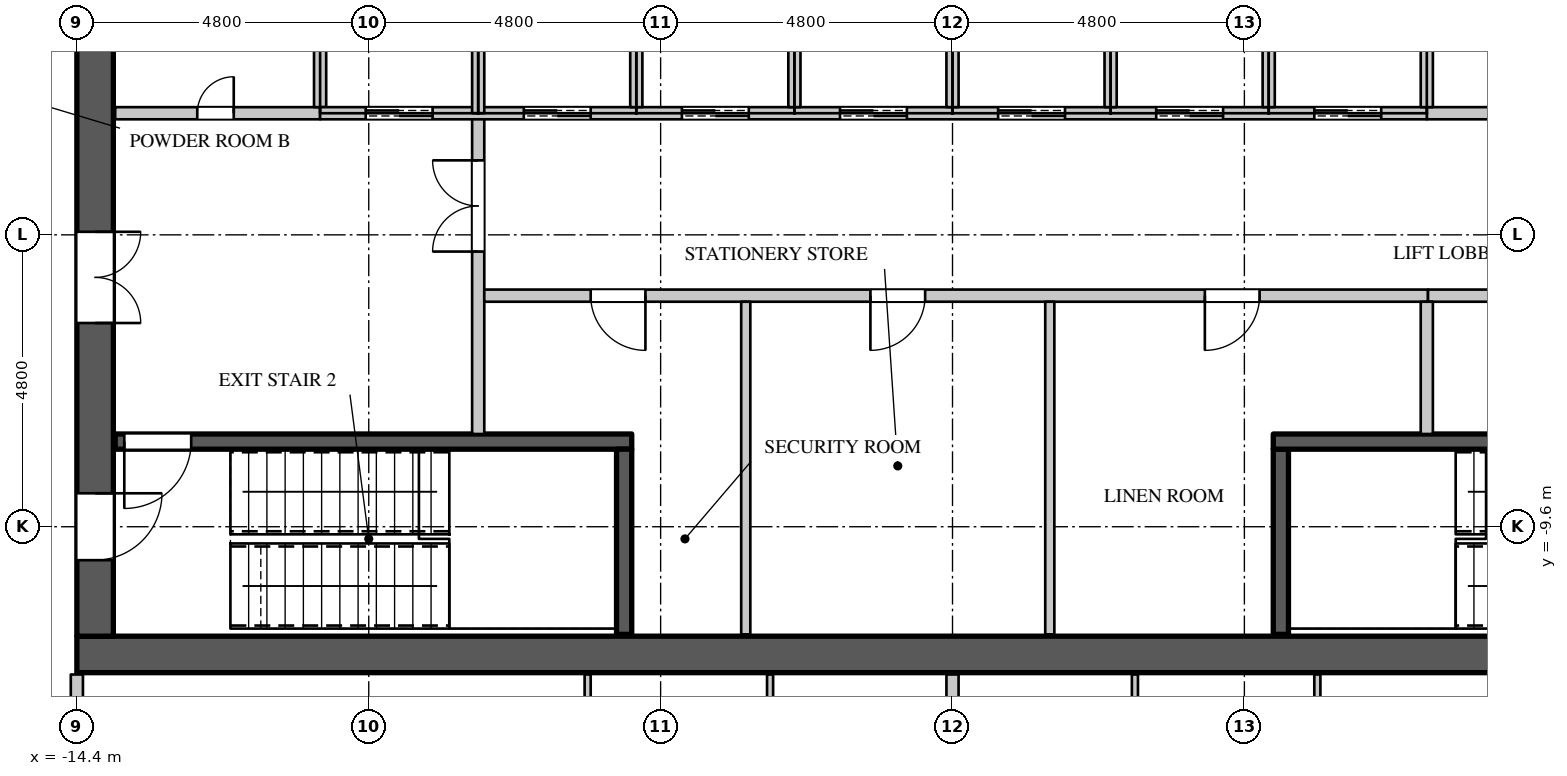
"""IFC4 building model, lengths in metres.
Left out: names, types, materials, properties, quantities, classifications, styles, units other than length and angle.
Written with IfcOpenShell. Run it as: python <this file> out.ifc"""

import sys

from ifc_helpers import new_model, si_unit, direction, frame, frame_2d, origin, place, context, subcontext, project, spatial, rectangle, extrude, element, fill, save


model = new_model("IFC4")
c1 = context("Model", 3, precision=1e-05, world=origin(), true_north=direction((0.0, 1.0)))
c2 = subcontext(c1, "Body", "Model", "MODEL_VIEW")
j1 = project(units=[si_unit("LENGTHUNIT", "METRE"), si_unit("PLANEANGLEUNIT", "RADIAN")], contexts=[c1])
p1 = place(None, origin())
s1 = spatial("IfcSite", under=j1, at=p1, CompositionType="ELEMENT")
p2 = place(p1, origin())
s2 = spatial("IfcBuilding", under=s1, at=p2, CompositionType="ELEMENT")
p3 = place(p2, frame((0.0, 0.0, 247.5)))
s3 = spatial("IfcBuildingStorey", under=s2, at=p3, CompositionType="ELEMENT", Elevation=247.5)
p4 = place(p3, frame((-14.4, -11.7, 0.0), z_axis=(0.0, 0.0, 1.0), x_axis=(1.0, 0.0, 0.0)))
e1 = element("IfcWall", 1, at=p4, inside=s3, PredefinedType="SHEAR", context=c2, shape_type="SweptSolid", body=[
    extrude(rectangle(XDim=28.8, YDim=0.6, at=frame_2d((14.4, 0.0))), origin(), (0.0, 0.0, 1.0), 4.2),
])
p5 = place(p3, frame((-14.1, -11.4, 0.0), z_axis=(0.0, 0.0, 1.0), x_axis=(0.0, 1.0, 0.0)))
e2 = element("IfcWall", 2, at=p5, inside=s3, PredefinedType="SHEAR", context=c2, shape_type="SweptSolid", body=[
    extrude(rectangle(XDim=22.8, YDim=0.6, at=frame_2d((11.4, 0.0))), origin(), (0.0, 0.0, 1.0), 4.2),
])
p6 = place(p5, frame((20.45, 0.0, 0.0)))
e3 = element("IfcOpeningElement", 3, at=p6, cuts=e2, PredefinedType="OPENING", context=c2, shape_type="SweptSolid", body=[
    extrude(rectangle(XDim=1.1, YDim=2.2, at=frame_2d((0.55, 1.1))), frame((0.0, 0.31, 0.0), z_axis=(0.0, -1.0, 0.0), x_axis=(1.0, 0.0, 0.0)), (0.0, 0.0, 1.0), 0.62),
])
p7 = place(p5, frame((1.25, 0.0, 0.0)))
e4 = element("IfcOpeningElement", 4, at=p7, cuts=e2, PredefinedType="OPENING", context=c2, shape_type="SweptSolid", body=[
    extrude(rectangle(XDim=1.1, YDim=2.2, at=frame_2d((0.55, 1.1))), frame((0.0, 0.31, 0.0), z_axis=(0.0, -1.0, 0.0), x_axis=(1.0, 0.0, 0.0)), (0.0, 0.0, 1.0), 0.62),
])
p8 = place(p5, frame((16.15, 0.0, 0.0)))
e5 = element("IfcOpeningElement", 5, at=p8, cuts=e2, PredefinedType="OPENING", context=c2, shape_type="SweptSolid", body=[
    extrude(rectangle(XDim=1.5, YDim=2.4, at=frame_2d((0.75, 1.2))), frame((0.0, 0.31, 0.0), z_axis=(0.0, -1.0, 0.0), x_axis=(1.0, 0.0, 0.0)), (0.0, 0.0, 1.0), 0.62),
])
p9 = place(p5, frame((5.15, 0.0, 0.0)))
e6 = element("IfcOpeningElement", 6, at=p9, cuts=e2, PredefinedType="OPENING", context=c2, shape_type="SweptSolid", body=[
    extrude(rectangle(XDim=1.5, YDim=2.4, at=frame_2d((0.75, 1.2))), frame((0.0, 0.31, 0.0), z_axis=(0.0, -1.0, 0.0), x_axis=(1.0, 0.0, 0.0)), (0.0, 0.0, 1.0), 0.62),
])
p10 = place(p3, frame((-14.4, -14.3, 0.0), z_axis=(0.0, 0.0, 1.0), x_axis=(0.0, 1.0, 0.0)))
e7 = element("IfcWall", 7, at=p10, inside=s3, PredefinedType="PARTITIONING", context=c2, shape_type="SweptSolid", body=[
    extrude(rectangle(XDim=2.27, YDim=0.2, at=frame_2d((1.135, 0.0))), origin(), (0.0, 0.0, 1.0), 3.95),
])
p11 = place(p3, frame((-7.8, -8.075, 0.0), z_axis=(0.0, 0.0, 1.0), x_axis=(0.0, 1.0, 0.0)))
e8 = element("IfcWall", 8, at=p11, inside=s3, PredefinedType="PARTITIONING", context=c2, shape_type="SweptSolid", body=[
    extrude(rectangle(XDim=5.275, YDim=0.2, at=frame_2d((2.637, 0.0))), origin(), (0.0, 0.0, 1.0), 3.95),
])
p12 = place(p11, frame((3.0, 0.0, 0.0)))
e9 = element("IfcOpeningElement", 9, at=p12, cuts=e8, PredefinedType="OPENING", context=c2, shape_type="SweptSolid", body=[
    extrude(rectangle(XDim=1.5, YDim=2.4, at=frame_2d((0.75, 1.2))), frame((0.0, 0.11, 0.0), z_axis=(0.0, -1.0, 0.0), x_axis=(1.0, 0.0, 0.0)), (0.0, 0.0, 1.0), 0.22),
])
p13 = place(p3, frame((-7.7, -5.8, 0.0), z_axis=(0.0, 0.0, 1.0), x_axis=(1.0, 0.0, 0.0)))
e10 = element("IfcWall", 10, at=p13, inside=s3, PredefinedType="PARTITIONING", context=c2, shape_type="SweptSolid", body=[
    extrude(rectangle(XDim=15.52, YDim=0.2, at=frame_2d((7.76, 0.0))), origin(), (0.0, 0.0, 1.0), 3.95),
])
p14 = place(p13, frame((1.75, 0.0, 0.0)))
e11 = element("IfcOpeningElement", 11, at=p14, cuts=e10, PredefinedType="OPENING", context=c2, shape_type="SweptSolid", body=[
    extrude(rectangle(XDim=0.9, YDim=2.2, at=frame_2d((0.45, 1.1))), frame((0.0, 0.11, 0.0), z_axis=(0.0, -1.0, 0.0), x_axis=(1.0, 0.0, 0.0)), (0.0, 0.0, 1.0), 0.22),
])
p15 = place(p13, frame((6.35, 0.0, 0.0)))
e12 = element("IfcOpeningElement", 12, at=p15, cuts=e10, PredefinedType="OPENING", context=c2, shape_type="SweptSolid", body=[
    extrude(rectangle(XDim=0.9, YDim=2.2, at=frame_2d((0.45, 1.1))), frame((0.0, 0.11, 0.0), z_axis=(0.0, -1.0, 0.0), x_axis=(1.0, 0.0, 0.0)), (0.0, 0.0, 1.0), 0.22),
])
p16 = place(p13, frame((11.85, 0.0, 0.0)))
e13 = element("IfcOpeningElement", 13, at=p16, cuts=e10, PredefinedType="OPENING", context=c2, shape_type="SweptSolid", body=[
    extrude(rectangle(XDim=0.9, YDim=2.2, at=frame_2d((0.45, 1.1))), frame((0.0, 0.11, 0.0), z_axis=(0.0, -1.0, 0.0), x_axis=(1.0, 0.0, 0.0)), (0.0, 0.0, 1.0), 0.22),
])
for number, where, z_axis, x_axis in (
    (14, (-3.4, -11.37, 0.0), (0.0, 0.0, 1.0), (0.0, 1.0, 0.0)),
    (15, (1.6, -11.37, 0.0), (0.0, 0.0, 1.0), (0.0, 1.0, 0.0)),
):
    element("IfcWall", number, at=place(p3, frame(where, z_axis=z_axis, x_axis=x_axis)), inside=s3, PredefinedType="PARTITIONING", context=c2, shape_type="SweptSolid", body=[
        extrude(rectangle(XDim=5.47, YDim=0.15, at=frame_2d((2.735, 0.0))), origin(), (0.0, 0.0, 1.0), 3.95),
    ])
p17 = place(p3, frame((0.0, -26.455, 0.0), z_axis=(0.0, 0.0, 1.0), x_axis=(0.0, 1.0, 0.0)))
e16 = element("IfcWall", 16, at=p17, inside=s3, PredefinedType="PARTITIONING", context=c2, shape_type="SweptSolid", body=[
    extrude(rectangle(XDim=14.425, YDim=0.2, at=frame_2d((7.212, 0.0))), origin(), (0.0, 0.0, 1.0), 3.95),
])
p18 = place(p3, frame((-13.77, -2.8, 0.0), z_axis=(0.0, 0.0, 1.0), x_axis=(1.0, 0.0, 0.0)))
e17 = element("IfcWall", 17, at=p18, inside=s3, PredefinedType="PARTITIONING", context=c2, shape_type="SweptSolid", body=[
    extrude(rectangle(XDim=3.37, YDim=0.2, at=frame_2d((1.685, 0.0))), origin(), (0.0, 0.0, 1.0), 3.95),
])
p19 = place(p18, frame((1.35, 0.0, 0.0)))
e18 = element("IfcOpeningElement", 18, at=p19, cuts=e17, PredefinedType="OPENING", context=c2, shape_type="SweptSolid", body=[
    extrude(rectangle(XDim=0.6, YDim=2.0, at=frame_2d((0.3, 1.0))), frame((0.0, 0.11, 0.0), z_axis=(0.0, -1.0, 0.0), x_axis=(1.0, 0.0, 0.0)), (0.0, 0.0, 1.0), 0.22),
])
p20 = place(p3, frame((7.82, -5.8, 0.0), z_axis=(0.0, 0.0, 1.0), x_axis=(1.0, 0.0, 0.0)))
e19 = element("IfcWall", 19, at=p20, inside=s3, PredefinedType="PARTITIONING", context=c2, shape_type="SweptSolid", body=[
    extrude(rectangle(XDim=5.95, YDim=0.2, at=frame_2d((2.975, 0.0))), origin(), (0.0, 0.0, 1.0), 3.95),
])
p21 = place(p20, frame((2.55, 0.0, 0.0)))
e20 = element("IfcOpeningElement", 20, at=p21, cuts=e19, PredefinedType="OPENING", context=c2, shape_type="SweptSolid", body=[
    extrude(rectangle(XDim=0.9, YDim=2.2, at=frame_2d((0.45, 1.1))), frame((0.0, 0.11, 0.0), z_axis=(0.0, -1.0, 0.0), x_axis=(1.0, 0.0, 0.0)), (0.0, 0.0, 1.0), 0.22),
])
p22 = place(p3, frame((7.8, -2.8, 0.0), z_axis=(0.0, 0.0, 1.0), x_axis=(1.0, 0.0, 0.0)))
e21 = element("IfcWall", 21, at=p22, inside=s3, PredefinedType="PARTITIONING", context=c2, shape_type="SweptSolid", body=[
    extrude(rectangle(XDim=5.97, YDim=0.2, at=frame_2d((2.985, 0.0))), origin(), (0.0, 0.0, 1.0), 3.95),
])
p23 = place(p22, frame((2.55, 0.0, 0.0)))
e22 = element("IfcOpeningElement", 22, at=p23, cuts=e21, PredefinedType="OPENING", context=c2, shape_type="SweptSolid", body=[
    extrude(rectangle(XDim=0.9, YDim=2.2, at=frame_2d((0.45, 1.1))), frame((0.0, 0.11, 0.0), z_axis=(0.0, -1.0, 0.0), x_axis=(1.0, 0.0, 0.0)), (0.0, 0.0, 1.0), 0.22),
])
p24 = place(p3, frame((7.8, -8.075, 0.0), z_axis=(0.0, 0.0, 1.0), x_axis=(0.0, 1.0, 0.0)))
e23 = element("IfcWall", 23, at=p24, inside=s3, PredefinedType="PARTITIONING", context=c2, shape_type="SweptSolid", body=[
    extrude(rectangle(XDim=2.175, YDim=0.2, at=frame_2d((1.087, 0.0))), origin(), (0.0, 0.0, 1.0), 3.95),
])
p25 = place(p3, frame((-10.4, -2.7, 0.0), z_axis=(0.0, 0.0, 1.0), x_axis=(0.0, 1.0, 0.0)))
e24 = element("IfcWall", 24, at=p25, inside=s3, PredefinedType="PARTITIONING", context=c2, shape_type="SweptSolid", body=[
    extrude(rectangle(XDim=2.7, YDim=0.2, at=frame_2d((1.35, 0.0))), origin(), (0.0, 0.0, 1.0), 3.95),
])
p26 = place(p3, frame((-10.4, -2.8, 0.0), z_axis=(0.0, 0.0, 1.0), x_axis=(1.0, 0.0, 0.0)))
e25 = element("IfcWall", 25, at=p26, inside=s3, PredefinedType="PARTITIONING", context=c2, shape_type="SweptSolid", body=[
    extrude(rectangle(XDim=18.2, YDim=0.2, at=frame_2d((9.1, 0.0))), origin(), (0.0, 0.0, 1.0), 3.95),
])
p27 = place(p26, frame((0.75, 0.0, 0.0)))
e26 = element("IfcOpeningElement", 26, at=p27, cuts=e25, PredefinedType="OPENING", context=c2, shape_type="SweptSolid", body=[
    extrude(rectangle(XDim=1.1, YDim=2.2, at=frame_2d((0.55, 1.1))), frame((0.0, 0.11, 0.0), z_axis=(0.0, -1.0, 0.0), x_axis=(1.0, 0.0, 0.0)), (0.0, 0.0, 1.0), 0.22),
])
p28 = place(p26, frame((3.35, 0.0, 0.0)))
e27 = element("IfcOpeningElement", 27, at=p28, cuts=e25, PredefinedType="OPENING", context=c2, shape_type="SweptSolid", body=[
    extrude(rectangle(XDim=1.1, YDim=2.2, at=frame_2d((0.55, 1.1))), frame((0.0, 0.11, 0.0), z_axis=(0.0, -1.0, 0.0), x_axis=(1.0, 0.0, 0.0)), (0.0, 0.0, 1.0), 0.22),
])
p29 = place(p26, frame((5.95, 0.0, 0.0)))
e28 = element("IfcOpeningElement", 28, at=p29, cuts=e25, PredefinedType="OPENING", context=c2, shape_type="SweptSolid", body=[
    extrude(rectangle(XDim=1.1, YDim=2.2, at=frame_2d((0.55, 1.1))), frame((0.0, 0.11, 0.0), z_axis=(0.0, -1.0, 0.0), x_axis=(1.0, 0.0, 0.0)), (0.0, 0.0, 1.0), 0.22),
])
p30 = place(p26, frame((8.55, 0.0, 0.0)))
e29 = element("IfcOpeningElement", 29, at=p30, cuts=e25, PredefinedType="OPENING", context=c2, shape_type="SweptSolid", body=[
    extrude(rectangle(XDim=1.1, YDim=2.2, at=frame_2d((0.55, 1.1))), frame((0.0, 0.11, 0.0), z_axis=(0.0, -1.0, 0.0), x_axis=(1.0, 0.0, 0.0)), (0.0, 0.0, 1.0), 0.22),
])
p31 = place(p26, frame((11.15, 0.0, 0.0)))
e30 = element("IfcOpeningElement", 30, at=p31, cuts=e25, PredefinedType="OPENING", context=c2, shape_type="SweptSolid", body=[
    extrude(rectangle(XDim=1.1, YDim=2.2, at=frame_2d((0.55, 1.1))), frame((0.0, 0.11, 0.0), z_axis=(0.0, -1.0, 0.0), x_axis=(1.0, 0.0, 0.0)), (0.0, 0.0, 1.0), 0.22),
])
p32 = place(p26, frame((13.75, 0.0, 0.0)))
e31 = element("IfcOpeningElement", 31, at=p32, cuts=e25, PredefinedType="OPENING", context=c2, shape_type="SweptSolid", body=[
    extrude(rectangle(XDim=1.1, YDim=2.2, at=frame_2d((0.55, 1.1))), frame((0.0, 0.11, 0.0), z_axis=(0.0, -1.0, 0.0), x_axis=(1.0, 0.0, 0.0)), (0.0, 0.0, 1.0), 0.22),
])
p33 = place(p26, frame((16.35, 0.0, 0.0)))
e32 = element("IfcOpeningElement", 32, at=p33, cuts=e25, PredefinedType="OPENING", context=c2, shape_type="SweptSolid", body=[
    extrude(rectangle(XDim=1.1, YDim=2.2, at=frame_2d((0.55, 1.1))), frame((0.0, 0.11, 0.0), z_axis=(0.0, -1.0, 0.0), x_axis=(1.0, 0.0, 0.0)), (0.0, 0.0, 1.0), 0.22),
])
p34 = place(p3, frame((-7.8, -2.8, 0.0), z_axis=(0.0, 0.0, 1.0), x_axis=(0.0, 1.0, 0.0)))
e33 = element("IfcWall", 33, at=p34, inside=s3, PredefinedType="PARTITIONING", context=c2, shape_type="SweptSolid", body=[
    extrude(rectangle(XDim=2.8, YDim=0.2, at=frame_2d((1.4, 0.0))), origin(), (0.0, 0.0, 1.0), 3.95),
])
p35 = place(p3, frame((-5.2, -2.7, 0.0), z_axis=(0.0, 0.0, 1.0), x_axis=(0.0, 1.0, 0.0)))
e34 = element("IfcWall", 34, at=p35, inside=s3, PredefinedType="PARTITIONING", context=c2, shape_type="SweptSolid", body=[
    extrude(rectangle(XDim=2.6, YDim=0.2, at=frame_2d((1.3, 0.0))), origin(), (0.0, 0.0, 1.0), 3.95),
])
p36 = place(p3, frame((-2.6, -2.7, 0.0), z_axis=(0.0, 0.0, 1.0), x_axis=(0.0, 1.0, 0.0)))
e35 = element("IfcWall", 35, at=p36, inside=s3, PredefinedType="PARTITIONING", context=c2, shape_type="SweptSolid", body=[
    extrude(rectangle(XDim=2.7, YDim=0.2, at=frame_2d((1.35, 0.0))), origin(), (0.0, 0.0, 1.0), 3.95),
])
for number, where, z_axis, x_axis in (
    (36, (0.0, -2.7, 0.0), (0.0, 0.0, 1.0), (0.0, 1.0, 0.0)),
    (37, (2.6, -2.7, 0.0), (0.0, 0.0, 1.0), (0.0, 1.0, 0.0)),
    (38, (5.2, -2.7, 0.0), (0.0, 0.0, 1.0), (0.0, 1.0, 0.0)),
    (39, (7.8, -2.7, 0.0), (0.0, 0.0, 1.0), (0.0, 1.0, 0.0)),
):
    element("IfcWall", number, at=place(p3, frame(where, z_axis=z_axis, x_axis=x_axis)), inside=s3, PredefinedType="PARTITIONING", context=c2, shape_type="SweptSolid", body=[
        extrude(rectangle(XDim=2.6, YDim=0.2, at=frame_2d((1.3, 0.0))), origin(), (0.0, 0.0, 1.0), 3.95),
    ])
p37 = place(p3, frame((-13.77, -8.2, 0.0), z_axis=(0.0, 0.0, 1.0), x_axis=(1.0, 0.0, 0.0)))
e40 = element("IfcWall", 40, at=p37, inside=s3, PredefinedType="SHEAR", context=c2, shape_type="SweptSolid", body=[
    extrude(rectangle(XDim=8.495, YDim=0.25, at=frame_2d((4.248, 0.0))), origin(), (0.0, 0.0, 1.0), 3.95),
])
p38 = place(p37, frame((0.15, 0.0, 0.0)))
e41 = element("IfcOpeningElement", 41, at=p38, cuts=e40, PredefinedType="OPENING", context=c2, shape_type="SweptSolid", body=[
    extrude(rectangle(XDim=1.1, YDim=2.2, at=frame_2d((0.55, 1.1))), frame((0.0, 0.135, 0.0), z_axis=(0.0, -1.0, 0.0), x_axis=(1.0, 0.0, 0.0)), (0.0, 0.0, 1.0), 0.27),
])
for number, where, z_axis, x_axis in (
    (42, (-5.4, -11.37, 0.0), (0.0, 0.0, 1.0), (0.0, 1.0, 0.0)),
    (43, (5.4, -11.37, 0.0), (0.0, 0.0, 1.0), (0.0, 1.0, 0.0)),
):
    element("IfcWall", number, at=place(p3, frame(where, z_axis=z_axis, x_axis=x_axis)), inside=s3, PredefinedType="SHEAR", context=c2, shape_type="SweptSolid", body=[
        extrude(rectangle(XDim=3.045, YDim=0.25, at=frame_2d((1.522, 0.0))), origin(), (0.0, 0.0, 1.0), 3.95),
    ])
p39 = place(p3, frame((5.275, -8.2, 0.0), z_axis=(0.0, 0.0, 1.0), x_axis=(1.0, 0.0, 0.0)))
e44 = element("IfcWall", 44, at=p39, inside=s3, PredefinedType="SHEAR", context=c2, shape_type="SweptSolid", body=[
    extrude(rectangle(XDim=8.495, YDim=0.25, at=frame_2d((4.248, 0.0))), origin(), (0.0, 0.0, 1.0), 3.95),
])
p40 = place(p3, frame((-6.0, -18.825, 0.0), z_axis=(0.0, 0.0, 1.0), x_axis=(0.0, 1.0, 0.0)))
e45 = element("IfcWall", 45, at=p40, inside=s3, PredefinedType="PARTITIONING", context=c2, shape_type="SweptSolid", body=[
    extrude(rectangle(XDim=6.795, YDim=0.1, at=frame_2d((3.397, 0.0))), origin(), (0.0, 0.0, 1.0), 3.95),
])
p41 = place(p3, frame((-3.0, -18.35, 0.0), z_axis=(0.0, 0.0, 1.0), x_axis=(0.0, 1.0, 0.0)))
e46 = element("IfcWall", 46, at=p41, inside=s3, PredefinedType="PARTITIONING", context=c2, shape_type="SweptSolid", body=[
    extrude(rectangle(XDim=6.32, YDim=0.1, at=frame_2d((3.16, 0.0))), origin(), (0.0, 0.0, 1.0), 3.95),
])
p42 = place(p3, frame((3.0, -18.55, 0.0), z_axis=(0.0, 0.0, 1.0), x_axis=(0.0, 1.0, 0.0)))
e47 = element("IfcWall", 47, at=p42, inside=s3, PredefinedType="PARTITIONING", context=c2, shape_type="SweptSolid", body=[
    extrude(rectangle(XDim=6.52, YDim=0.1, at=frame_2d((3.26, 0.0))), origin(), (0.0, 0.0, 1.0), 3.95),
])
p43 = place(p3, frame((6.0, -19.025, 0.0), z_axis=(0.0, 0.0, 1.0), x_axis=(0.0, 1.0, 0.0)))
e48 = element("IfcWall", 48, at=p43, inside=s3, PredefinedType="PARTITIONING", context=c2, shape_type="SweptSolid", body=[
    extrude(rectangle(XDim=6.995, YDim=0.1, at=frame_2d((3.498, 0.0))), origin(), (0.0, 0.0, 1.0), 3.95),
])
p44 = place(p19, origin())
e49 = element("IfcDoor", 49, at=p44, inside=s3, OperationType="SINGLE_SWING_RIGHT", PredefinedType="DOOR", context=c2, shape_type="SweptSolid", body=[
    extrude(rectangle(XDim=0.6, YDim=2.0, at=frame_2d((0.3, 1.0))), frame((0.0, 0.025, 0.0), z_axis=(0.0, -1.0, 0.0), x_axis=(1.0, 0.0, 0.0)), (0.0, 0.0, 1.0), 0.05),
])
fill(e18, e49)
p45 = place(p14, origin())
e50 = element("IfcDoor", 50, at=p45, inside=s3, OperationType="SINGLE_SWING_LEFT", PredefinedType="DOOR", context=c2, shape_type="SweptSolid", body=[
    extrude(rectangle(XDim=0.9, YDim=2.2, at=frame_2d((0.45, 1.1))), frame((0.0, 0.025, 0.0), z_axis=(0.0, -1.0, 0.0), x_axis=(1.0, 0.0, 0.0)), (0.0, 0.0, 1.0), 0.05),
])
fill(e11, e50)
p46 = place(p15, origin())
e51 = element("IfcDoor", 51, at=p46, inside=s3, OperationType="SINGLE_SWING_RIGHT", PredefinedType="DOOR", context=c2, shape_type="SweptSolid", body=[
    extrude(rectangle(XDim=0.9, YDim=2.2, at=frame_2d((0.45, 1.1))), frame((0.0, 0.025, 0.0), z_axis=(0.0, -1.0, 0.0), x_axis=(1.0, 0.0, 0.0)), (0.0, 0.0, 1.0), 0.05),
])
fill(e12, e51)
p47 = place(p16, origin())
e52 = element("IfcDoor", 52, at=p47, inside=s3, OperationType="SINGLE_SWING_RIGHT", PredefinedType="DOOR", context=c2, shape_type="SweptSolid", body=[
    extrude(rectangle(XDim=0.9, YDim=2.2, at=frame_2d((0.45, 1.1))), frame((0.0, 0.025, 0.0), z_axis=(0.0, -1.0, 0.0), x_axis=(1.0, 0.0, 0.0)), (0.0, 0.0, 1.0), 0.05),
])
fill(e13, e52)
p48 = place(p27, origin())
e53 = element("IfcDoor", 53, at=p48, inside=s3, OperationType="DOUBLE_DOOR_SLIDING", PredefinedType="DOOR", context=c2, shape_type="SweptSolid", body=[
    extrude(rectangle(XDim=1.1, YDim=2.2, at=frame_2d((0.55, 1.1))), frame((0.0, 0.025, 0.0), z_axis=(0.0, -1.0, 0.0), x_axis=(1.0, 0.0, 0.0)), (0.0, 0.0, 1.0), 0.05),
])
fill(e26, e53)
p49 = place(p28, origin())
e54 = element("IfcDoor", 54, at=p49, inside=s3, OperationType="DOUBLE_DOOR_SLIDING", PredefinedType="DOOR", context=c2, shape_type="SweptSolid", body=[
    extrude(rectangle(XDim=1.1, YDim=2.2, at=frame_2d((0.55, 1.1))), frame((0.0, 0.025, 0.0), z_axis=(0.0, -1.0, 0.0), x_axis=(1.0, 0.0, 0.0)), (0.0, 0.0, 1.0), 0.05),
])
fill(e27, e54)
p50 = place(p29, origin())
e55 = element("IfcDoor", 55, at=p50, inside=s3, OperationType="DOUBLE_DOOR_SLIDING", PredefinedType="DOOR", context=c2, shape_type="SweptSolid", body=[
    extrude(rectangle(XDim=1.1, YDim=2.2, at=frame_2d((0.55, 1.1))), frame((0.0, 0.025, 0.0), z_axis=(0.0, -1.0, 0.0), x_axis=(1.0, 0.0, 0.0)), (0.0, 0.0, 1.0), 0.05),
])
fill(e28, e55)
p51 = place(p30, origin())
e56 = element("IfcDoor", 56, at=p51, inside=s3, OperationType="DOUBLE_DOOR_SLIDING", PredefinedType="DOOR", context=c2, shape_type="SweptSolid", body=[
    extrude(rectangle(XDim=1.1, YDim=2.2, at=frame_2d((0.55, 1.1))), frame((0.0, 0.025, 0.0), z_axis=(0.0, -1.0, 0.0), x_axis=(1.0, 0.0, 0.0)), (0.0, 0.0, 1.0), 0.05),
])
fill(e29, e56)
p52 = place(p31, origin())
e57 = element("IfcDoor", 57, at=p52, inside=s3, OperationType="DOUBLE_DOOR_SLIDING", PredefinedType="DOOR", context=c2, shape_type="SweptSolid", body=[
    extrude(rectangle(XDim=1.1, YDim=2.2, at=frame_2d((0.55, 1.1))), frame((0.0, 0.025, 0.0), z_axis=(0.0, -1.0, 0.0), x_axis=(1.0, 0.0, 0.0)), (0.0, 0.0, 1.0), 0.05),
])
fill(e30, e57)
p53 = place(p32, origin())
e58 = element("IfcDoor", 58, at=p53, inside=s3, OperationType="DOUBLE_DOOR_SLIDING", PredefinedType="DOOR", context=c2, shape_type="SweptSolid", body=[
    extrude(rectangle(XDim=1.1, YDim=2.2, at=frame_2d((0.55, 1.1))), frame((0.0, 0.025, 0.0), z_axis=(0.0, -1.0, 0.0), x_axis=(1.0, 0.0, 0.0)), (0.0, 0.0, 1.0), 0.05),
])
fill(e31, e58)
p54 = place(p33, origin())
e59 = element("IfcDoor", 59, at=p54, inside=s3, OperationType="DOUBLE_DOOR_SLIDING", PredefinedType="DOOR", context=c2, shape_type="SweptSolid", body=[
    extrude(rectangle(XDim=1.1, YDim=2.2, at=frame_2d((0.55, 1.1))), frame((0.0, 0.025, 0.0), z_axis=(0.0, -1.0, 0.0), x_axis=(1.0, 0.0, 0.0)), (0.0, 0.0, 1.0), 0.05),
])
fill(e32, e59)
p55 = place(p38, origin())
e60 = element("IfcDoor", 60, at=p55, inside=s3, OperationType="SINGLE_SWING_RIGHT", PredefinedType="DOOR", context=c2, shape_type="SweptSolid", body=[
    extrude(rectangle(XDim=1.1, YDim=2.2, at=frame_2d((0.55, 1.1))), frame((0.0, 0.025, 0.0), z_axis=(0.0, -1.0, 0.0), x_axis=(1.0, 0.0, 0.0)), (0.0, 0.0, 1.0), 0.05),
])
fill(e41, e60)
p56 = place(p12, origin())
e61 = element("IfcDoor", 61, at=p56, inside=s3, OperationType="DOUBLE_DOOR_SINGLE_SWING", PredefinedType="DOOR", context=c2, shape_type="SweptSolid", body=[
    extrude(rectangle(XDim=1.5, YDim=2.4, at=frame_2d((0.75, 1.2))), frame((0.0, 0.025, 0.0), z_axis=(0.0, -1.0, 0.0), x_axis=(1.0, 0.0, 0.0)), (0.0, 0.0, 1.0), 0.05),
])
fill(e9, e61)
p57 = place(p7, origin())
e62 = element("IfcDoor", 62, at=p57, inside=s3, OperationType="SINGLE_SWING_LEFT", PredefinedType="DOOR", context=c2, shape_type="SweptSolid", body=[
    extrude(rectangle(XDim=1.1, YDim=2.2, at=frame_2d((0.55, 1.1))), frame((0.0, -0.245, 0.0), z_axis=(0.0, -1.0, 0.0), x_axis=(1.0, 0.0, 0.0)), (0.0, 0.0, 1.0), 0.05),
])
fill(e4, e62)
p58 = place(p9, origin())
e63 = element("IfcDoor", 63, at=p58, inside=s3, OperationType="DOUBLE_DOOR_SINGLE_SWING", PredefinedType="DOOR", context=c2, shape_type="SweptSolid", body=[
    extrude(rectangle(XDim=1.5, YDim=2.4, at=frame_2d((0.75, 1.2))), frame((0.0, -0.245, 0.0), z_axis=(0.0, -1.0, 0.0), x_axis=(1.0, 0.0, 0.0)), (0.0, 0.0, 1.0), 0.05),
])
fill(e6, e63)
save(model, sys.argv[1])
